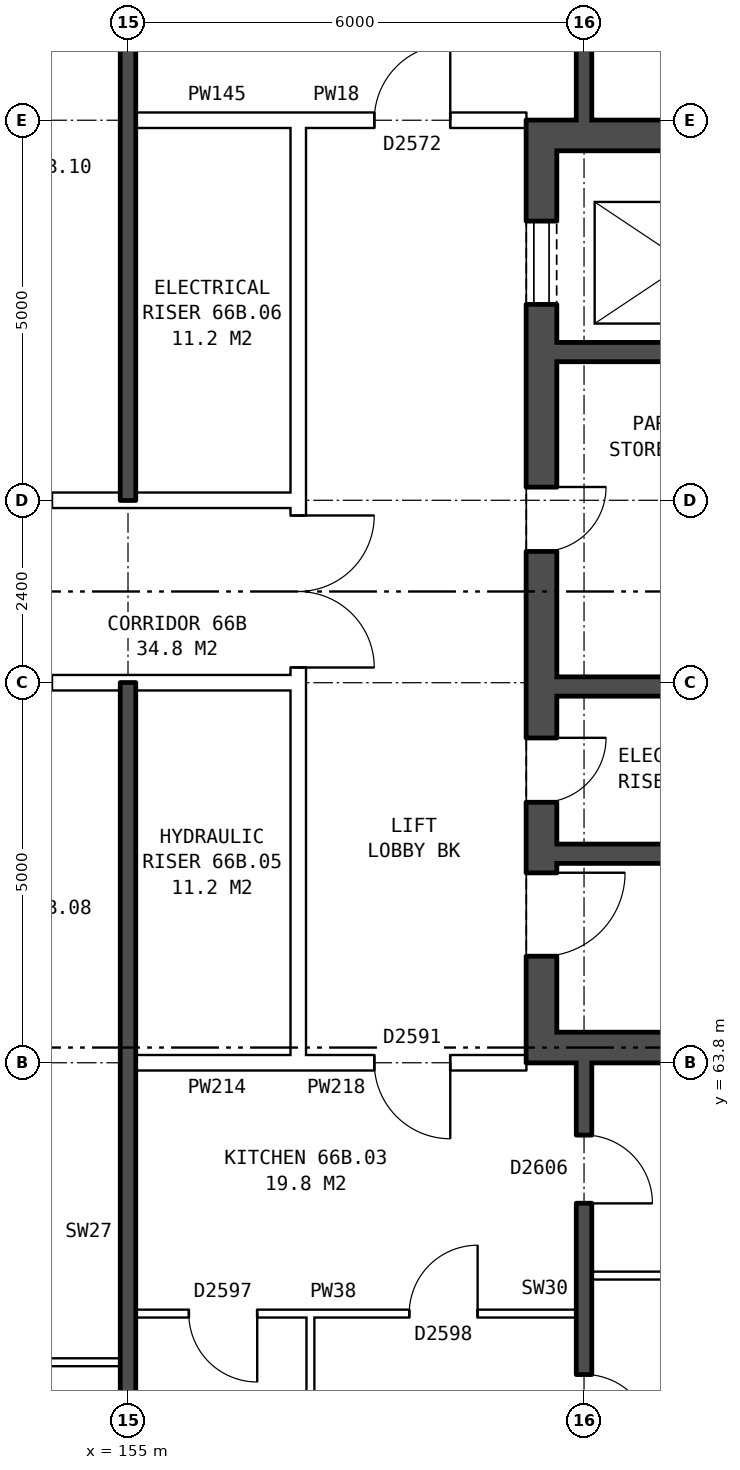
"""IFC4 building model, lengths in metres.
Left out: names, types, materials, properties, quantities, classifications, styles, units other than length and angle.
Written with IfcOpenShell. Run it as: python <this file> out.ifc"""

import sys

from ifc_helpers import new_model, si_unit, direction, frame, frame_2d, origin, place, context, subcontext, project, spatial, rectangle, extrude, element, fill, save


model = new_model("IFC4")
c1 = context("Model", 3, precision=1e-05, world=origin(), true_north=direction((0.0, 1.0)))
c2 = subcontext(c1, "Body", "Model", "MODEL_VIEW")
j1 = project(units=[si_unit("LENGTHUNIT", "METRE"), si_unit("PLANEANGLEUNIT", "RADIAN")], contexts=[c1])
p1 = place(None, origin())
s1 = spatial("IfcSite", under=j1, at=p1, CompositionType="ELEMENT")
p2 = place(p1, origin())
s2 = spatial("IfcBuilding", under=s1, at=p2, CompositionType="ELEMENT")
p3 = place(p2, frame((0.0, 0.0, 233.8)))
s3 = spatial("IfcBuildingStorey", under=s2, at=p3, CompositionType="ELEMENT", Elevation=233.8)
p4 = place(p3, frame((160.44, 76.2, 0.0), z_axis=(0.0, 0.0, 1.0), x_axis=(0.0, -1.0, 0.0)))
e1 = element("IfcWall", 1, at=p4, inside=s3, PredefinedType="SHEAR", context=c2, shape_type="SweptSolid", body=[
    extrude(rectangle(XDim=12.4, YDim=0.4, at=frame_2d((6.2, 0.0))), origin(), (0.0, 0.0, 1.0), 2.85),
])
p5 = place(p4, frame((1.325, 0.0, 0.0)))
e2 = element("IfcOpeningElement", 2, at=p5, cuts=e1, PredefinedType="OPENING", context=c2, shape_type="SweptSolid", body=[
    extrude(rectangle(XDim=1.1, YDim=2.1, at=frame_2d((0.55, 1.05))), frame((0.0, 0.21, 0.0), z_axis=(0.0, -1.0, 0.0), x_axis=(1.0, 0.0, 0.0)), (0.0, 0.0, 1.0), 0.42),
])
p6 = place(p4, frame((4.825, 0.0, 0.0)))
e3 = element("IfcOpeningElement", 3, at=p6, cuts=e1, PredefinedType="OPENING", context=c2, shape_type="SweptSolid", body=[
    extrude(rectangle(XDim=0.85, YDim=2.1, at=frame_2d((0.425, 1.05))), frame((0.0, 0.21, 0.0), z_axis=(0.0, -1.0, 0.0), x_axis=(1.0, 0.0, 0.0)), (0.0, 0.0, 1.0), 0.42),
])
p7 = place(p4, frame((9.9, 0.0, 0.0)))
e4 = element("IfcOpeningElement", 4, at=p7, cuts=e1, PredefinedType="OPENING", context=c2, shape_type="SweptSolid", body=[
    extrude(rectangle(XDim=1.1, YDim=2.1, at=frame_2d((0.55, 1.05))), frame((0.0, 0.21, 0.0), z_axis=(0.0, -1.0, 0.0), x_axis=(1.0, 0.0, 0.0)), (0.0, 0.0, 1.0), 0.42),
])
p8 = place(p4, frame((8.125, 0.0, 0.0)))
e5 = element("IfcOpeningElement", 5, at=p8, cuts=e1, PredefinedType="OPENING", context=c2, shape_type="SweptSolid", body=[
    extrude(rectangle(XDim=0.85, YDim=2.1, at=frame_2d((0.425, 1.05))), frame((0.0, 0.21, 0.0), z_axis=(0.0, -1.0, 0.0), x_axis=(1.0, 0.0, 0.0)), (0.0, 0.0, 1.0), 0.42),
])
for number, where, z_axis, x_axis in (
    (6, (160.64, 76.0, 0.0), (0.0, 0.0, 1.0), (1.0, 0.0, 0.0)),
    (7, (160.64, 64.0, 0.0), (0.0, 0.0, 1.0), (1.0, 0.0, 0.0)),
):
    element("IfcWall", number, at=place(p3, frame(where, z_axis=z_axis, x_axis=x_axis)), inside=s3, PredefinedType="SHEAR", context=c2, shape_type="SweptSolid", body=[
        extrude(rectangle(XDim=7.6, YDim=0.4, at=frame_2d((3.8, 0.0))), origin(), (0.0, 0.0, 1.0), 2.85),
    ])
p9 = place(p3, frame((160.64, 73.15, 0.0), z_axis=(0.0, 0.0, 1.0), x_axis=(1.0, 0.0, 0.0)))
e8 = element("IfcWall", 8, at=p9, inside=s3, PredefinedType="SHEAR", context=c2, shape_type="SweptSolid", body=[
    extrude(rectangle(XDim=4.775, YDim=0.25, at=frame_2d((2.388, 0.0))), origin(), (0.0, 0.0, 1.0), 2.85),
])
p10 = place(p3, frame((160.64, 68.75, 0.0), z_axis=(0.0, 0.0, 1.0), x_axis=(1.0, 0.0, 0.0)))
e9 = element("IfcWall", 9, at=p10, inside=s3, PredefinedType="SHEAR", context=c2, shape_type="SweptSolid", body=[
    extrude(rectangle(XDim=7.6, YDim=0.25, at=frame_2d((3.8, 0.0))), origin(), (0.0, 0.0, 1.0), 2.85),
])
p11 = place(p10, frame((5.175, 0.0, 0.0)))
e10 = element("IfcOpeningElement", 10, at=p11, cuts=e9, PredefinedType="OPENING", context=c2, shape_type="SweptSolid", body=[
    extrude(rectangle(XDim=1.1, YDim=2.1, at=frame_2d((0.55, 1.05))), frame((0.0, 0.135, 0.0), z_axis=(0.0, -1.0, 0.0), x_axis=(1.0, 0.0, 0.0)), (0.0, 0.0, 1.0), 0.27),
])
p12 = place(p10, frame((2.975, 0.0, 0.0)))
e11 = element("IfcOpeningElement", 11, at=p12, cuts=e9, PredefinedType="OPENING", context=c2, shape_type="SweptSolid", body=[
    extrude(rectangle(XDim=0.85, YDim=2.1, at=frame_2d((0.425, 1.05))), frame((0.0, 0.135, 0.0), z_axis=(0.0, -1.0, 0.0), x_axis=(1.0, 0.0, 0.0)), (0.0, 0.0, 1.0), 0.27),
])
p13 = place(p3, frame((160.64, 66.55, 0.0), z_axis=(0.0, 0.0, 1.0), x_axis=(1.0, 0.0, 0.0)))
e12 = element("IfcWall", 12, at=p13, inside=s3, PredefinedType="SHEAR", context=c2, shape_type="SweptSolid", body=[
    extrude(rectangle(XDim=2.525, YDim=0.25, at=frame_2d((1.263, 0.0))), origin(), (0.0, 0.0, 1.0), 2.85),
])
p14 = place(p3, frame((157.24, 63.9, 0.0), z_axis=(0.0, 0.0, 1.0), x_axis=(0.0, 1.0, 0.0)))
e13 = element("IfcWall", 13, at=p14, inside=s3, PredefinedType="PARTITIONING", context=c2, shape_type="SweptSolid", body=[
    extrude(rectangle(XDim=12.2, YDim=0.2, at=frame_2d((6.1, 0.0))), origin(), (0.0, 0.0, 1.0), 2.85),
])
p15 = place(p14, frame((5.1, 0.0, 0.0)))
e14 = element("IfcOpeningElement", 14, at=p15, cuts=e13, PredefinedType="OPENING", context=c2, shape_type="SweptSolid", body=[
    extrude(rectangle(XDim=2.0, YDim=2.1, at=frame_2d((1.0, 1.05))), frame((0.0, 0.11, 0.0), z_axis=(0.0, -1.0, 0.0), x_axis=(1.0, 0.0, 0.0)), (0.0, 0.0, 1.0), 0.22),
])
p16 = place(p3, frame((152.0, 59.86, 0.0), z_axis=(0.0, 0.0, 1.0), x_axis=(1.0, 0.0, 0.0)))
e15 = element("IfcWall", 15, at=p16, inside=s3, PredefinedType="PARTITIONING", context=c2, shape_type="SweptSolid", body=[
    extrude(rectangle(XDim=2.9, YDim=0.1, at=frame_2d((1.45, 0.0))), origin(), (0.0, 0.0, 1.0), 2.85),
])
p17 = place(p16, frame((1.0, 0.0, 0.0)))
e16 = element("IfcOpeningElement", 16, at=p17, cuts=e15, PredefinedType="OPENING", context=c2, shape_type="SweptSolid", body=[
    extrude(rectangle(XDim=0.9, YDim=2.1, at=frame_2d((0.45, 1.05))), frame((0.0, 0.06, 0.0), z_axis=(0.0, -1.0, 0.0), x_axis=(1.0, 0.0, 0.0)), (0.0, 0.0, 1.0), 0.12),
])
p18 = place(p3, frame((155.1, 60.5, 0.0), z_axis=(0.0, 0.0, 1.0), x_axis=(1.0, 0.0, 0.0)))
e17 = element("IfcWall", 17, at=p18, inside=s3, PredefinedType="PARTITIONING", context=c2, shape_type="SweptSolid", body=[
    extrude(rectangle(XDim=5.8, YDim=0.1, at=frame_2d((2.9, 0.0))), origin(), (0.0, 0.0, 1.0), 2.85),
])
p19 = place(p18, frame((3.6, 0.0, 0.0)))
e18 = element("IfcOpeningElement", 18, at=p19, cuts=e17, PredefinedType="OPENING", context=c2, shape_type="SweptSolid", body=[
    extrude(rectangle(XDim=0.9, YDim=2.1, at=frame_2d((0.45, 1.05))), frame((0.0, 0.06, 0.0), z_axis=(0.0, -1.0, 0.0), x_axis=(1.0, 0.0, 0.0)), (0.0, 0.0, 1.0), 0.12),
])
p20 = place(p18, frame((0.7, 0.0, 0.0)))
e19 = element("IfcOpeningElement", 19, at=p20, cuts=e17, PredefinedType="OPENING", context=c2, shape_type="SweptSolid", body=[
    extrude(rectangle(XDim=0.9, YDim=2.1, at=frame_2d((0.45, 1.05))), frame((0.0, 0.06, 0.0), z_axis=(0.0, -1.0, 0.0), x_axis=(1.0, 0.0, 0.0)), (0.0, 0.0, 1.0), 0.12),
])
p21 = place(p3, frame((161.1, 61.0, 0.0), z_axis=(0.0, 0.0, 1.0), x_axis=(1.0, 0.0, 0.0)))
e20 = element("IfcWall", 20, at=p21, inside=s3, PredefinedType="PARTITIONING", context=c2, shape_type="SweptSolid", body=[
    extrude(rectangle(XDim=7.54, YDim=0.1, at=frame_2d((3.77, 0.0))), origin(), (0.0, 0.0, 1.0), 2.85),
])
p22 = place(p3, frame((155.1, 63.8, 0.0), z_axis=(0.0, 0.0, 1.0), x_axis=(1.0, 0.0, 0.0)))
e21 = element("IfcWall", 21, at=p22, inside=s3, PredefinedType="PARTITIONING", context=c2, shape_type="SweptSolid", body=[
    extrude(rectangle(XDim=2.14, YDim=0.2, at=frame_2d((1.07, 0.0))), origin(), (0.0, 0.0, 1.0), 2.85),
])
p23 = place(p3, frame((157.24, 63.8, 0.0), z_axis=(0.0, 0.0, 1.0), x_axis=(1.0, 0.0, 0.0)))
e22 = element("IfcWall", 22, at=p23, inside=s3, PredefinedType="PARTITIONING", context=c2, shape_type="SweptSolid", body=[
    extrude(rectangle(XDim=3.0, YDim=0.2, at=frame_2d((1.5, 0.0))), origin(), (0.0, 0.0, 1.0), 2.85),
])
p24 = place(p23, frame((1.0, 0.0, 0.0)))
e23 = element("IfcOpeningElement", 23, at=p24, cuts=e22, PredefinedType="OPENING", context=c2, shape_type="SweptSolid", body=[
    extrude(rectangle(XDim=1.0, YDim=2.1, at=frame_2d((0.5, 1.05))), frame((0.0, 0.11, 0.0), z_axis=(0.0, -1.0, 0.0), x_axis=(1.0, 0.0, 0.0)), (0.0, 0.0, 1.0), 0.22),
])
p25 = place(p3, frame((142.76, 68.8, 0.0), z_axis=(0.0, 0.0, 1.0), x_axis=(1.0, 0.0, 0.0)))
e24 = element("IfcWall", 24, at=p25, inside=s3, PredefinedType="PARTITIONING", context=c2, shape_type="SweptSolid", body=[
    extrude(rectangle(XDim=14.48, YDim=0.2, at=frame_2d((7.24, 0.0))), origin(), (0.0, 0.0, 1.0), 2.85),
])
p26 = place(p25, frame((4.24, 0.0, 0.0)))
e25 = element("IfcOpeningElement", 25, at=p26, cuts=e24, PredefinedType="OPENING", context=c2, shape_type="SweptSolid", body=[
    extrude(rectangle(XDim=1.0, YDim=2.1, at=frame_2d((0.5, 1.05))), frame((0.0, 0.11, 0.0), z_axis=(0.0, -1.0, 0.0), x_axis=(1.0, 0.0, 0.0)), (0.0, 0.0, 1.0), 0.22),
])
p27 = place(p25, frame((10.24, 0.0, 0.0)))
e26 = element("IfcOpeningElement", 26, at=p27, cuts=e24, PredefinedType="OPENING", context=c2, shape_type="SweptSolid", body=[
    extrude(rectangle(XDim=1.0, YDim=2.1, at=frame_2d((0.5, 1.05))), frame((0.0, 0.11, 0.0), z_axis=(0.0, -1.0, 0.0), x_axis=(1.0, 0.0, 0.0)), (0.0, 0.0, 1.0), 0.22),
])
p28 = place(p3, frame((142.76, 71.2, 0.0), z_axis=(0.0, 0.0, 1.0), x_axis=(1.0, 0.0, 0.0)))
e27 = element("IfcWall", 27, at=p28, inside=s3, PredefinedType="PARTITIONING", context=c2, shape_type="SweptSolid", body=[
    extrude(rectangle(XDim=14.48, YDim=0.2, at=frame_2d((7.24, 0.0))), origin(), (0.0, 0.0, 1.0), 2.85),
])
p29 = place(p28, frame((4.24, 0.0, 0.0)))
e28 = element("IfcOpeningElement", 28, at=p29, cuts=e27, PredefinedType="OPENING", context=c2, shape_type="SweptSolid", body=[
    extrude(rectangle(XDim=1.0, YDim=2.1, at=frame_2d((0.5, 1.05))), frame((0.0, 0.11, 0.0), z_axis=(0.0, -1.0, 0.0), x_axis=(1.0, 0.0, 0.0)), (0.0, 0.0, 1.0), 0.22),
])
p30 = place(p28, frame((10.24, 0.0, 0.0)))
e29 = element("IfcOpeningElement", 29, at=p30, cuts=e27, PredefinedType="OPENING", context=c2, shape_type="SweptSolid", body=[
    extrude(rectangle(XDim=1.0, YDim=2.1, at=frame_2d((0.5, 1.05))), frame((0.0, 0.11, 0.0), z_axis=(0.0, -1.0, 0.0), x_axis=(1.0, 0.0, 0.0)), (0.0, 0.0, 1.0), 0.22),
])
p31 = place(p3, frame((155.1, 76.2, 0.0), z_axis=(0.0, 0.0, 1.0), x_axis=(1.0, 0.0, 0.0)))
e30 = element("IfcWall", 30, at=p31, inside=s3, PredefinedType="PARTITIONING", context=c2, shape_type="SweptSolid", body=[
    extrude(rectangle(XDim=2.14, YDim=0.2, at=frame_2d((1.07, 0.0))), origin(), (0.0, 0.0, 1.0), 2.85),
])
p32 = place(p3, frame((157.24, 76.2, 0.0), z_axis=(0.0, 0.0, 1.0), x_axis=(1.0, 0.0, 0.0)))
e31 = element("IfcWall", 31, at=p32, inside=s3, PredefinedType="PARTITIONING", context=c2, shape_type="SweptSolid", body=[
    extrude(rectangle(XDim=3.0, YDim=0.2, at=frame_2d((1.5, 0.0))), origin(), (0.0, 0.0, 1.0), 2.85),
])
p33 = place(p32, frame((1.0, 0.0, 0.0)))
e32 = element("IfcOpeningElement", 32, at=p33, cuts=e31, PredefinedType="OPENING", context=c2, shape_type="SweptSolid", body=[
    extrude(rectangle(XDim=1.0, YDim=2.1, at=frame_2d((0.5, 1.05))), frame((0.0, 0.11, 0.0), z_axis=(0.0, -1.0, 0.0), x_axis=(1.0, 0.0, 0.0)), (0.0, 0.0, 1.0), 0.22),
])
for number, where, z_axis, x_axis in (
    (33, (155.0, 54.36, 0.0), (0.0, 0.0, 1.0), (0.0, 1.0, 0.0)),
    (34, (155.0, 71.2, 0.0), (0.0, 0.0, 1.0), (0.0, 1.0, 0.0)),
):
    element("IfcWall", number, at=place(p3, frame(where, z_axis=z_axis, x_axis=x_axis)), inside=s3, PredefinedType="SOLIDWALL", context=c2, shape_type="SweptSolid", body=[
        extrude(rectangle(XDim=14.44, YDim=0.2, at=frame_2d((7.22, 0.0))), origin(), (0.0, 0.0, 1.0), 2.85),
    ])
p34 = place(p3, frame((157.4, 57.75, 0.0), z_axis=(0.0, 0.0, 1.0), x_axis=(0.0, 1.0, 0.0)))
e35 = element("IfcWall", 35, at=p34, inside=s3, PredefinedType="PARTITIONING", context=c2, shape_type="SweptSolid", body=[
    extrude(rectangle(XDim=2.7, YDim=0.1, at=frame_2d((1.35, 0.0))), origin(), (0.0, 0.0, 1.0), 2.85),
])
p35 = place(p3, frame((161.0, 54.36, 0.0), z_axis=(0.0, 0.0, 1.0), x_axis=(0.0, 1.0, 0.0)))
e36 = element("IfcWall", 36, at=p35, inside=s3, PredefinedType="SOLIDWALL", context=c2, shape_type="SweptSolid", body=[
    extrude(rectangle(XDim=9.44, YDim=0.2, at=frame_2d((4.72, 0.0))), origin(), (0.0, 0.0, 1.0), 2.85),
])
p36 = place(p35, frame((1.37, 0.0, 0.0)))
e37 = element("IfcOpeningElement", 37, at=p36, cuts=e36, PredefinedType="OPENING", context=c2, shape_type="SweptSolid", body=[
    extrude(rectangle(XDim=0.9, YDim=2.1, at=frame_2d((0.45, 1.05))), frame((0.0, 0.11, 0.0), z_axis=(0.0, -1.0, 0.0), x_axis=(1.0, 0.0, 0.0)), (0.0, 0.0, 1.0), 0.22),
])
p37 = place(p35, frame((4.44, 0.0, 0.0)))
e38 = element("IfcOpeningElement", 38, at=p37, cuts=e36, PredefinedType="OPENING", context=c2, shape_type="SweptSolid", body=[
    extrude(rectangle(XDim=0.9, YDim=2.1, at=frame_2d((0.45, 1.05))), frame((0.0, 0.11, 0.0), z_axis=(0.0, -1.0, 0.0), x_axis=(1.0, 0.0, 0.0)), (0.0, 0.0, 1.0), 0.22),
])
p38 = place(p35, frame((7.59, 0.0, 0.0)))
e39 = element("IfcOpeningElement", 39, at=p38, cuts=e36, PredefinedType="OPENING", context=c2, shape_type="SweptSolid", body=[
    extrude(rectangle(XDim=0.9, YDim=2.1, at=frame_2d((0.45, 1.05))), frame((0.0, 0.11, 0.0), z_axis=(0.0, -1.0, 0.0), x_axis=(1.0, 0.0, 0.0)), (0.0, 0.0, 1.0), 0.22),
])
p39 = place(p3, frame((161.0, 76.2, 0.0), z_axis=(0.0, 0.0, 1.0), x_axis=(0.0, 1.0, 0.0)))
e40 = element("IfcWall", 40, at=p39, inside=s3, PredefinedType="SOLIDWALL", context=c2, shape_type="SweptSolid", body=[
    extrude(rectangle(XDim=9.44, YDim=0.2, at=frame_2d((4.72, 0.0))), origin(), (0.0, 0.0, 1.0), 2.85),
])
p40 = place(p39, frame((1.2, 0.0, 0.0)))
e41 = element("IfcOpeningElement", 41, at=p40, cuts=e40, PredefinedType="OPENING", context=c2, shape_type="SweptSolid", body=[
    extrude(rectangle(XDim=0.9, YDim=2.1, at=frame_2d((0.45, 1.05))), frame((0.0, 0.11, 0.0), z_axis=(0.0, -1.0, 0.0), x_axis=(1.0, 0.0, 0.0)), (0.0, 0.0, 1.0), 0.22),
])
p41 = place(p5, origin())
e42 = element("IfcDoor", 42, at=p41, inside=s3, OperationType="DOUBLE_DOOR_SLIDING", PredefinedType="DOOR", context=c2, shape_type="SweptSolid", body=[
    extrude(rectangle(XDim=1.1, YDim=2.1, at=frame_2d((0.55, 1.05))), frame((0.0, 0.185, 0.0), z_axis=(0.0, -1.0, 0.0), x_axis=(1.0, 0.0, 0.0)), (0.0, 0.0, 1.0), 0.05),
])
fill(e2, e42)
p42 = place(p6, origin())
e43 = element("IfcDoor", 43, at=p42, inside=s3, OperationType="SINGLE_SWING_LEFT", PredefinedType="DOOR", context=c2, shape_type="SweptSolid", body=[
    extrude(rectangle(XDim=0.85, YDim=2.1, at=frame_2d((0.425, 1.05))), frame((0.0, 0.185, 0.0), z_axis=(0.0, -1.0, 0.0), x_axis=(1.0, 0.0, 0.0)), (0.0, 0.0, 1.0), 0.05),
])
fill(e3, e43)
p43 = place(p7, origin())
e44 = element("IfcDoor", 44, at=p43, inside=s3, OperationType="SINGLE_SWING_LEFT", PredefinedType="DOOR", context=c2, shape_type="SweptSolid", body=[
    extrude(rectangle(XDim=1.1, YDim=2.1, at=frame_2d((0.55, 1.05))), frame((0.0, 0.185, 0.0), z_axis=(0.0, -1.0, 0.0), x_axis=(1.0, 0.0, 0.0)), (0.0, 0.0, 1.0), 0.05),
])
fill(e4, e44)
p44 = place(p8, origin())
e45 = element("IfcDoor", 45, at=p44, inside=s3, OperationType="SINGLE_SWING_LEFT", PredefinedType="DOOR", context=c2, shape_type="SweptSolid", body=[
    extrude(rectangle(XDim=0.85, YDim=2.1, at=frame_2d((0.425, 1.05))), frame((0.0, 0.185, 0.0), z_axis=(0.0, -1.0, 0.0), x_axis=(1.0, 0.0, 0.0)), (0.0, 0.0, 1.0), 0.05),
])
fill(e5, e45)
p45 = place(p15, frame((2.0, 0.0, 0.0), z_axis=(0.0, 0.0, 1.0), x_axis=(-1.0, 0.0, 0.0)))
e46 = element("IfcDoor", 46, at=p45, inside=s3, OperationType="DOUBLE_DOOR_SINGLE_SWING", PredefinedType="DOOR", context=c2, shape_type="SweptSolid", body=[
    extrude(rectangle(XDim=2.0, YDim=2.1, at=frame_2d((1.0, 1.05))), frame((0.0, 0.025, 0.0), z_axis=(0.0, -1.0, 0.0), x_axis=(1.0, 0.0, 0.0)), (0.0, 0.0, 1.0), 0.05),
])
fill(e14, e46)
p46 = place(p37, frame((0.9, 0.0, 0.0), z_axis=(0.0, 0.0, 1.0), x_axis=(-1.0, 0.0, 0.0)))
e47 = element("IfcDoor", 47, at=p46, inside=s3, OperationType="SINGLE_SWING_RIGHT", PredefinedType="DOOR", context=c2, shape_type="SweptSolid", body=[
    extrude(rectangle(XDim=0.9, YDim=2.1, at=frame_2d((0.45, 1.05))), frame((0.0, 0.025, 0.0), z_axis=(0.0, -1.0, 0.0), x_axis=(1.0, 0.0, 0.0)), (0.0, 0.0, 1.0), 0.05),
])
fill(e38, e47)
p47 = place(p38, frame((0.9, 0.0, 0.0), z_axis=(0.0, 0.0, 1.0), x_axis=(-1.0, 0.0, 0.0)))
e48 = element("IfcDoor", 48, at=p47, inside=s3, OperationType="SINGLE_SWING_RIGHT", PredefinedType="DOOR", context=c2, shape_type="SweptSolid", body=[
    extrude(rectangle(XDim=0.9, YDim=2.1, at=frame_2d((0.45, 1.05))), frame((0.0, 0.025, 0.0), z_axis=(0.0, -1.0, 0.0), x_axis=(1.0, 0.0, 0.0)), (0.0, 0.0, 1.0), 0.05),
])
fill(e39, e48)
p48 = place(p24, frame((1.0, 0.0, 0.0), z_axis=(0.0, 0.0, 1.0), x_axis=(-1.0, 0.0, 0.0)))
e49 = element("IfcDoor", 49, at=p48, inside=s3, OperationType="SINGLE_SWING_LEFT", PredefinedType="DOOR", context=c2, shape_type="SweptSolid", body=[
    extrude(rectangle(XDim=1.0, YDim=2.1, at=frame_2d((0.5, 1.05))), frame((0.0, 0.025, 0.0), z_axis=(0.0, -1.0, 0.0), x_axis=(1.0, 0.0, 0.0)), (0.0, 0.0, 1.0), 0.05),
])
fill(e23, e49)
p49 = place(p19, origin())
e50 = element("IfcDoor", 50, at=p49, inside=s3, OperationType="SINGLE_SWING_RIGHT", PredefinedType="DOOR", context=c2, shape_type="SweptSolid", body=[
    extrude(rectangle(XDim=0.9, YDim=2.1, at=frame_2d((0.45, 1.05))), frame((0.0, 0.025, 0.0), z_axis=(0.0, -1.0, 0.0), x_axis=(1.0, 0.0, 0.0)), (0.0, 0.0, 1.0), 0.05),
])
fill(e18, e50)
p50 = place(p20, frame((0.9, 0.0, 0.0), z_axis=(0.0, 0.0, 1.0), x_axis=(-1.0, 0.0, 0.0)))
e51 = element("IfcDoor", 51, at=p50, inside=s3, OperationType="SINGLE_SWING_LEFT", PredefinedType="DOOR", context=c2, shape_type="SweptSolid", body=[
    extrude(rectangle(XDim=0.9, YDim=2.1, at=frame_2d((0.45, 1.05))), frame((0.0, 0.025, 0.0), z_axis=(0.0, -1.0, 0.0), x_axis=(1.0, 0.0, 0.0)), (0.0, 0.0, 1.0), 0.05),
])
fill(e19, e51)
p51 = place(p33, origin())
e52 = element("IfcDoor", 52, at=p51, inside=s3, OperationType="SINGLE_SWING_RIGHT", PredefinedType="DOOR", context=c2, shape_type="SweptSolid", body=[
    extrude(rectangle(XDim=1.0, YDim=2.1, at=frame_2d((0.5, 1.05))), frame((0.0, 0.025, 0.0), z_axis=(0.0, -1.0, 0.0), x_axis=(1.0, 0.0, 0.0)), (0.0, 0.0, 1.0), 0.05),
])
fill(e32, e52)
save(model, sys.argv[1])
